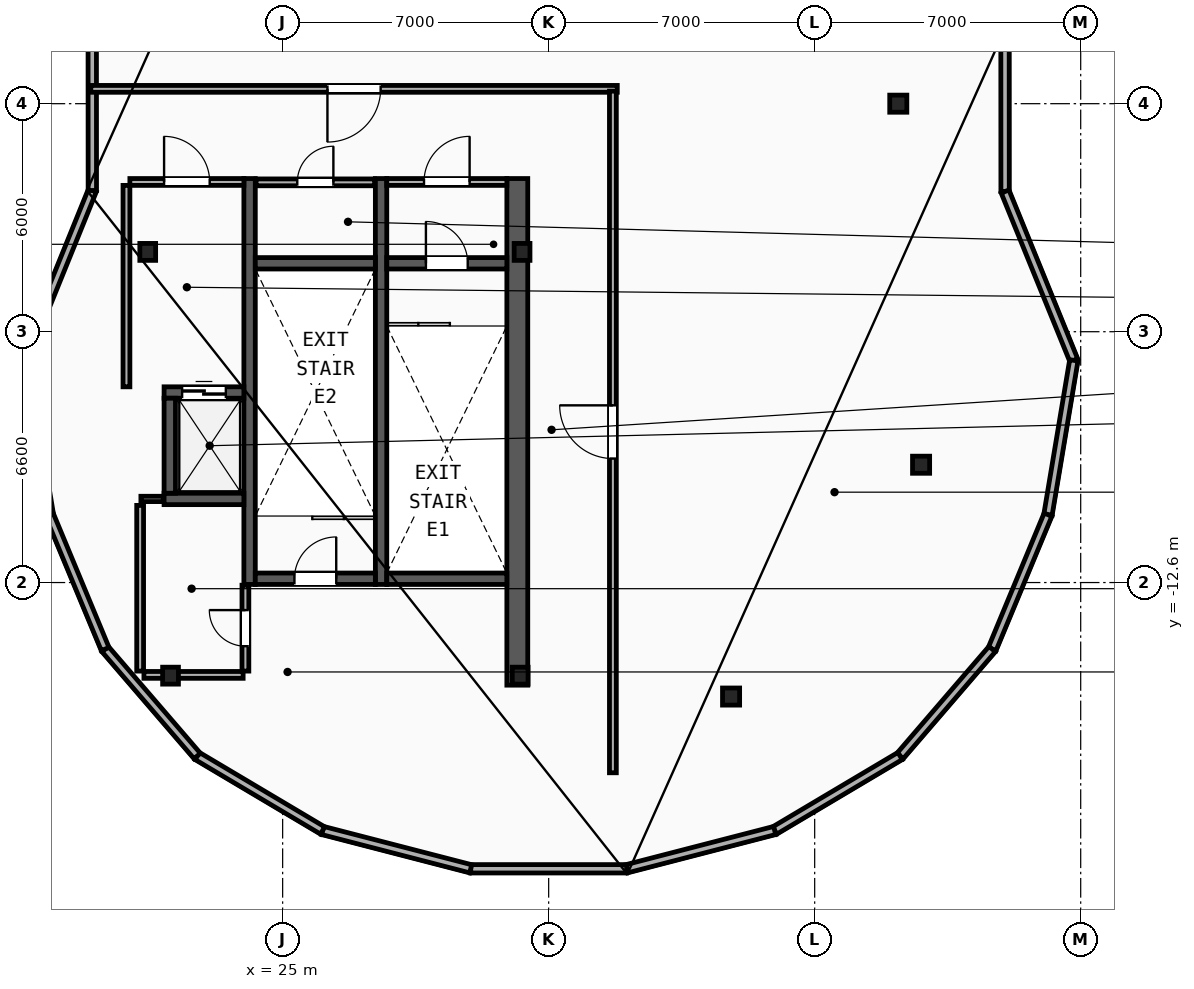
"""IFC4 building model, lengths in metres.
Left out: names, types, materials, properties, quantities, classifications, styles, units other than length and angle.
Written with IfcOpenShell. Run it as: python <this file> out.ifc"""

import sys

from ifc_helpers import new_model, si_unit, direction, frame, frame_2d, origin, origin_2d, place, context, subcontext, project, spatial, rectangle, hollow_rectangle, i_section, extrude, element, fill, save


model = new_model("IFC4")
c1 = context("Model", 3, precision=1e-05, world=origin(), true_north=direction((0.0, 1.0)))
c2 = subcontext(c1, "Body", "Model", "MODEL_VIEW")
j1 = project(units=[si_unit("LENGTHUNIT", "METRE"), si_unit("PLANEANGLEUNIT", "RADIAN")], contexts=[c1])
p1 = place(None, origin())
s1 = spatial("IfcSite", under=j1, at=p1, CompositionType="ELEMENT")
p2 = place(p1, origin())
s2 = spatial("IfcBuilding", under=s1, at=p2, CompositionType="ELEMENT")
p3 = place(p2, frame((0.0, 0.0, 286.4)))
s3 = spatial("IfcBuildingStorey", under=s2, at=p3, CompositionType="ELEMENT", Elevation=286.4)
for number, where, z_axis, x_axis in (
    (1, (31.3, -3.9, 0.0), (0.0, 0.0, 1.0), (1.0, 0.0, 0.0)),
    (2, (21.45, -3.9, 0.0), (0.0, 0.0, 1.0), (1.0, 0.0, 0.0)),
    (3, (22.05, -15.05, 0.0), (0.0, 0.0, 1.0), (1.0, 0.0, 0.0)),
    (4, (31.25, -15.05, 0.0), (0.0, 0.0, 1.0), (1.0, 0.0, 0.0)),
):
    element("IfcColumn", number, at=place(p3, frame(where, z_axis=z_axis, x_axis=x_axis)), inside=s3, PredefinedType="COLUMN", context=c2, shape_type="SweptSolid", body=[
        extrude(i_section(OverallWidth=0.416, OverallDepth=0.446, WebThickness=0.039, FlangeThickness=0.063, FilletRadius=0.018, at=origin_2d()), origin(), (0.0, 0.0, 1.0), 4.93),
    ])
for number, where, z_axis, x_axis in (
    (5, (41.2, 0.0, 0.0), (0.0, 0.0, 1.0), (1.0, 0.0, 0.0)),
    (6, (41.8, -9.5, 0.0), (0.0, 0.0, 1.0), (1.0, 0.0, 0.0)),
    (7, (36.8, -15.6, 0.0), (0.0, 0.0, 1.0), (1.0, 0.0, 0.0)),
):
    element("IfcColumn", number, at=place(p3, frame(where, z_axis=z_axis, x_axis=x_axis)), inside=s3, PredefinedType="COLUMN", context=c2, shape_type="SweptSolid", body=[
        extrude(hollow_rectangle(XDim=0.45, YDim=0.45, WallThickness=0.025, at=origin_2d()), origin(), (0.0, 0.0, 1.0), 4.93),
    ])
p4 = place(p3, frame((44.008, 2.284, 5.2), z_axis=(0.0, 0.0, 1.0), x_axis=(0.000531349553, -0.999999858834, 0.0)))
e8 = element("IfcWall", 8, at=p4, inside=s3, PredefinedType="PARAPET", context=c2, shape_type="SweptSolid", body=[
    extrude(rectangle(XDim=4.595, YDim=0.22, at=frame_2d((2.297, 0.0))), origin(), (0.0, 0.0, 1.0), 2.0),
])
p5 = place(p3, frame((44.01, -2.311, 5.2), z_axis=(0.0, 0.0, 1.0), x_axis=(0.377043082347, -0.926195721246, 0.0)))
e9 = element("IfcWall", 9, at=p5, inside=s3, PredefinedType="PARAPET", context=c2, shape_type="SweptSolid", body=[
    extrude(rectangle(XDim=4.797, YDim=0.22, at=frame_2d((2.399, 0.0))), origin(), (0.0, 0.0, 1.0), 2.0),
])
p6 = place(p3, frame((45.819, -6.754, 5.2), z_axis=(0.0, 0.0, 1.0), x_axis=(-0.165110628258, -0.986275053135, 0.0)))
e10 = element("IfcWall", 10, at=p6, inside=s3, PredefinedType="PARAPET", context=c2, shape_type="SweptSolid", body=[
    extrude(rectangle(XDim=4.116, YDim=0.22, at=frame_2d((2.058, 0.0))), origin(), (0.0, 0.0, 1.0), 2.0),
])
p7 = place(p3, frame((45.14, -10.814, 5.2), z_axis=(0.0, 0.0, 1.0), x_axis=(-0.383669064321, -0.923470654154, 0.0)))
e11 = element("IfcWall", 11, at=p7, inside=s3, PredefinedType="PARAPET", context=c2, shape_type="SweptSolid", body=[
    extrude(rectangle(XDim=3.829, YDim=0.22, at=frame_2d((1.915, 0.0))), origin(), (0.0, 0.0, 1.0), 2.0),
])
p8 = place(p3, frame((43.67, -14.351, 5.2), z_axis=(0.0, 0.0, 1.0), x_axis=(-0.652473840564, -0.757811247858, 0.0)))
e12 = element("IfcWall", 12, at=p8, inside=s3, PredefinedType="PARAPET", context=c2, shape_type="SweptSolid", body=[
    extrude(rectangle(XDim=3.713, YDim=0.22, at=frame_2d((1.856, 0.0))), origin(), (0.0, 0.0, 1.0), 2.0),
])
p9 = place(p3, frame((41.248, -17.164, 5.2), z_axis=(0.0, 0.0, 1.0), x_axis=(-0.859779697284, -0.5106651272, 0.0)))
e13 = element("IfcWall", 13, at=p9, inside=s3, PredefinedType="PARAPET", context=c2, shape_type="SweptSolid", body=[
    extrude(rectangle(XDim=3.839, YDim=0.22, at=frame_2d((1.919, 0.0))), origin(), (0.0, 0.0, 1.0), 2.0),
])
p10 = place(p3, frame((37.948, -19.125, 5.2), z_axis=(0.0, 0.0, 1.0), x_axis=(-0.968151728793, -0.250364194795, 0.0)))
e14 = element("IfcWall", 14, at=p10, inside=s3, PredefinedType="PARAPET", context=c2, shape_type="SweptSolid", body=[
    extrude(rectangle(XDim=4.024, YDim=0.22, at=frame_2d((2.012, 0.0))), origin(), (0.0, 0.0, 1.0), 2.0),
])
p11 = place(p3, frame((34.051, -20.132, 5.2), z_axis=(0.0, 0.0, 1.0), x_axis=(-1.0, 0.0, 0.0)))
e15 = element("IfcWall", 15, at=p11, inside=s3, PredefinedType="PARAPET", context=c2, shape_type="SweptSolid", body=[
    extrude(rectangle(XDim=4.103, YDim=0.22, at=frame_2d((2.051, 0.0))), origin(), (0.0, 0.0, 1.0), 2.0),
])
p12 = place(p3, frame((29.949, -20.132, 5.2), z_axis=(0.0, 0.0, 1.0), x_axis=(-0.968151728793, 0.250364194795, 0.0)))
e16 = element("IfcWall", 16, at=p12, inside=s3, PredefinedType="PARAPET", context=c2, shape_type="SweptSolid", body=[
    extrude(rectangle(XDim=4.024, YDim=0.22, at=frame_2d((2.012, 0.0))), origin(), (0.0, 0.0, 1.0), 2.0),
])
p13 = place(p3, frame((26.052, -19.125, 5.2), z_axis=(0.0, 0.0, 1.0), x_axis=(-0.859779697284, 0.5106651272, 0.0)))
e17 = element("IfcWall", 17, at=p13, inside=s3, PredefinedType="PARAPET", context=c2, shape_type="SweptSolid", body=[
    extrude(rectangle(XDim=3.839, YDim=0.22, at=frame_2d((1.919, 0.0))), origin(), (0.0, 0.0, 1.0), 2.0),
])
p14 = place(p3, frame((22.752, -17.164, 5.2), z_axis=(0.0, 0.0, 1.0), x_axis=(-0.652473840564, 0.757811247858, 0.0)))
e18 = element("IfcWall", 18, at=p14, inside=s3, PredefinedType="PARAPET", context=c2, shape_type="SweptSolid", body=[
    extrude(rectangle(XDim=3.713, YDim=0.22, at=frame_2d((1.856, 0.0))), origin(), (0.0, 0.0, 1.0), 2.0),
])
p15 = place(p3, frame((20.33, -14.351, 5.2), z_axis=(0.0, 0.0, 1.0), x_axis=(-0.383669064321, 0.923470654154, 0.0)))
e19 = element("IfcWall", 19, at=p15, inside=s3, PredefinedType="PARAPET", context=c2, shape_type="SweptSolid", body=[
    extrude(rectangle(XDim=3.829, YDim=0.22, at=frame_2d((1.915, 0.0))), origin(), (0.0, 0.0, 1.0), 2.0),
])
p16 = place(p3, frame((18.86, -10.814, 5.2), z_axis=(0.0, 0.0, 1.0), x_axis=(-0.165110628258, 0.986275053135, 0.0)))
e20 = element("IfcWall", 20, at=p16, inside=s3, PredefinedType="PARAPET", context=c2, shape_type="SweptSolid", body=[
    extrude(rectangle(XDim=4.116, YDim=0.22, at=frame_2d((2.058, 0.0))), origin(), (0.0, 0.0, 1.0), 2.0),
])
p17 = place(p3, frame((18.181, -6.754, 5.2), z_axis=(0.0, 0.0, 1.0), x_axis=(0.375532386136, 0.92680927216, 0.0)))
e21 = element("IfcWall", 21, at=p17, inside=s3, PredefinedType="PARAPET", context=c2, shape_type="SweptSolid", body=[
    extrude(rectangle(XDim=4.823, YDim=0.22, at=frame_2d((2.412, 0.0))), origin(), (0.0, 0.0, 1.0), 2.0),
])
p18 = place(p3, frame((19.992, -2.284, 5.2), z_axis=(0.0, 0.0, 1.0), x_axis=(-0.000531349553, 0.999999858834, 0.0)))
e22 = element("IfcWall", 22, at=p18, inside=s3, PredefinedType="PARAPET", context=c2, shape_type="SweptSolid", body=[
    extrude(rectangle(XDim=4.595, YDim=0.22, at=frame_2d((2.297, 0.0))), origin(), (0.0, 0.0, 1.0), 2.0),
])
p19 = place(p3, frame((31.175, -15.3, 0.0), z_axis=(0.0, 0.0, 1.0), x_axis=(0.0, 1.0, 0.0)))
e23 = element("IfcWall", 23, at=p19, inside=s3, PredefinedType="SHEAR", context=c2, shape_type="SweptSolid", body=[
    extrude(rectangle(XDim=13.33, YDim=0.55, at=frame_2d((6.665, 0.0))), origin(), (0.0, 0.0, 1.0), 4.93),
])
for number, where, z_axis, x_axis in (
    (24, (27.59, -12.65, 0.0), (0.0, 0.0, 1.0), (0.0, 1.0, 0.0)),
    (25, (24.13, -12.65, 0.0), (0.0, 0.0, 1.0), (0.0, 1.0, 0.0)),
):
    element("IfcWall", number, at=place(p3, frame(where, z_axis=z_axis, x_axis=x_axis)), inside=s3, PredefinedType="SHEAR", context=c2, shape_type="SweptSolid", body=[
        extrude(rectangle(XDim=10.68, YDim=0.3, at=frame_2d((5.34, 0.0))), origin(), (0.0, 0.0, 1.0), 4.93),
    ])
p20 = place(p3, frame((27.74, -4.2, 0.0), z_axis=(0.0, 0.0, 1.0), x_axis=(1.0, 0.0, 0.0)))
e26 = element("IfcWall", 26, at=p20, inside=s3, PredefinedType="SHEAR", context=c2, shape_type="SweptSolid", body=[
    extrude(rectangle(XDim=3.16, YDim=0.3, at=frame_2d((1.58, 0.0))), origin(), (0.0, 0.0, 1.0), 4.93),
])
p21 = place(p20, frame((1.03, 0.0, 0.0)))
e27 = element("IfcOpeningElement", 27, at=p21, cuts=e26, PredefinedType="OPENING", context=c2, shape_type="SweptSolid", body=[
    extrude(rectangle(XDim=1.1, YDim=2.15, at=frame_2d((0.55, 1.075))), frame((0.0, 0.16, 0.0), z_axis=(0.0, -1.0, 0.0), x_axis=(1.0, 0.0, 0.0)), (0.0, 0.0, 1.0), 0.32),
])
p22 = place(p3, frame((27.74, -12.5, 0.0), z_axis=(0.0, 0.0, 1.0), x_axis=(1.0, 0.0, 0.0)))
e28 = element("IfcWall", 28, at=p22, inside=s3, PredefinedType="SHEAR", context=c2, shape_type="SweptSolid", body=[
    extrude(rectangle(XDim=3.16, YDim=0.3, at=frame_2d((1.58, 0.0))), origin(), (0.0, 0.0, 1.0), 4.93),
])
p23 = place(p3, frame((24.28, -12.5, 0.0), z_axis=(0.0, 0.0, 1.0), x_axis=(1.0, 0.0, 0.0)))
e29 = element("IfcWall", 29, at=p23, inside=s3, PredefinedType="SHEAR", context=c2, shape_type="SweptSolid", body=[
    extrude(rectangle(XDim=3.16, YDim=0.3, at=frame_2d((1.58, 0.0))), origin(), (0.0, 0.0, 1.0), 4.93),
])
p24 = place(p23, frame((1.03, 0.0, 0.0)))
e30 = element("IfcOpeningElement", 30, at=p24, cuts=e29, PredefinedType="OPENING", context=c2, shape_type="SweptSolid", body=[
    extrude(rectangle(XDim=1.1, YDim=2.15, at=frame_2d((0.55, 1.075))), frame((0.0, 0.16, 0.0), z_axis=(0.0, -1.0, 0.0), x_axis=(1.0, 0.0, 0.0)), (0.0, 0.0, 1.0), 0.32),
])
p25 = place(p3, frame((24.28, -4.2, 0.0), z_axis=(0.0, 0.0, 1.0), x_axis=(1.0, 0.0, 0.0)))
e31 = element("IfcWall", 31, at=p25, inside=s3, PredefinedType="SHEAR", context=c2, shape_type="SweptSolid", body=[
    extrude(rectangle(XDim=3.16, YDim=0.3, at=frame_2d((1.58, 0.0))), origin(), (0.0, 0.0, 1.0), 4.93),
])
p26 = place(p3, frame((20.89, -7.45, 0.0), z_axis=(0.0, 0.0, 1.0), x_axis=(0.0, 1.0, 0.0)))
e32 = element("IfcWall", 32, at=p26, inside=s3, PredefinedType="PARTITIONING", context=c2, shape_type="SweptSolid", body=[
    extrude(rectangle(XDim=5.3, YDim=0.18, at=frame_2d((2.65, 0.0))), origin(), (0.0, 0.0, 1.0), 4.93),
])
p27 = place(p3, frame((20.98, -2.06, 0.0), z_axis=(0.0, 0.0, 1.0), x_axis=(1.0, 0.0, 0.0)))
e33 = element("IfcWall", 33, at=p27, inside=s3, PredefinedType="PARTITIONING", context=c2, shape_type="SweptSolid", body=[
    extrude(rectangle(XDim=3.0, YDim=0.18, at=frame_2d((1.5, 0.0))), origin(), (0.0, 0.0, 1.0), 4.93),
])
p28 = place(p27, frame((0.9, 0.0, 0.0)))
e34 = element("IfcOpeningElement", 34, at=p28, cuts=e33, PredefinedType="OPENING", context=c2, shape_type="SweptSolid", body=[
    extrude(rectangle(XDim=1.2, YDim=2.15, at=frame_2d((0.6, 1.075))), frame((0.0, 0.1, 0.0), z_axis=(0.0, -1.0, 0.0), x_axis=(1.0, 0.0, 0.0)), (0.0, 0.0, 1.0), 0.2),
])
p29 = place(p3, frame((27.74, -2.06, 0.0), z_axis=(0.0, 0.0, 1.0), x_axis=(1.0, 0.0, 0.0)))
e35 = element("IfcWall", 35, at=p29, inside=s3, PredefinedType="PARTITIONING", context=c2, shape_type="SweptSolid", body=[
    extrude(rectangle(XDim=3.16, YDim=0.18, at=frame_2d((1.58, 0.0))), origin(), (0.0, 0.0, 1.0), 4.93),
])
p30 = place(p29, frame((0.98, 0.0, 0.0)))
e36 = element("IfcOpeningElement", 36, at=p30, cuts=e35, PredefinedType="OPENING", context=c2, shape_type="SweptSolid", body=[
    extrude(rectangle(XDim=1.2, YDim=2.15, at=frame_2d((0.6, 1.075))), frame((0.0, 0.1, 0.0), z_axis=(0.0, -1.0, 0.0), x_axis=(1.0, 0.0, 0.0)), (0.0, 0.0, 1.0), 0.2),
])
p31 = place(p3, frame((21.88, -7.6, 0.0), z_axis=(0.0, 0.0, 1.0), x_axis=(1.0, 0.0, 0.0)))
e37 = element("IfcWall", 37, at=p31, inside=s3, PredefinedType="SHEAR", context=c2, shape_type="SweptSolid", body=[
    extrude(rectangle(XDim=2.1, YDim=0.3, at=frame_2d((1.05, 0.0))), origin(), (0.0, 0.0, 1.0), 4.93),
])
p32 = place(p31, frame((0.475, 0.0, 0.0)))
e38 = element("IfcOpeningElement", 38, at=p32, cuts=e37, PredefinedType="OPENING", context=c2, shape_type="SweptSolid", body=[
    extrude(rectangle(XDim=1.15, YDim=2.2, at=frame_2d((0.575, 1.1))), frame((0.0, 0.16, 0.0), z_axis=(0.0, -1.0, 0.0), x_axis=(1.0, 0.0, 0.0)), (0.0, 0.0, 1.0), 0.32),
])
p33 = place(p3, frame((21.88, -10.4, 0.0), z_axis=(0.0, 0.0, 1.0), x_axis=(1.0, 0.0, 0.0)))
e39 = element("IfcWall", 39, at=p33, inside=s3, PredefinedType="SHEAR", context=c2, shape_type="SweptSolid", body=[
    extrude(rectangle(XDim=2.1, YDim=0.3, at=frame_2d((1.05, 0.0))), origin(), (0.0, 0.0, 1.0), 4.93),
])
p34 = place(p3, frame((22.03, -10.25, 0.0), z_axis=(0.0, 0.0, 1.0), x_axis=(0.0, 1.0, 0.0)))
e40 = element("IfcWall", 40, at=p34, inside=s3, PredefinedType="SHEAR", context=c2, shape_type="SweptSolid", body=[
    extrude(rectangle(XDim=2.5, YDim=0.3, at=frame_2d((1.25, 0.0))), origin(), (0.0, 0.0, 1.0), 4.93),
])
p35 = place(p3, frame((21.27, -10.4, 0.0), z_axis=(0.0, 0.0, 1.0), x_axis=(1.0, 0.0, 0.0)))
e41 = element("IfcWall", 41, at=p35, inside=s3, PredefinedType="PARTITIONING", context=c2, shape_type="SweptSolid", body=[
    extrude(rectangle(XDim=0.59, YDim=0.14, at=frame_2d((0.295, 0.0))), origin(), (0.0, 0.0, 1.0), 4.93),
])
p36 = place(p3, frame((21.25, -14.93, 0.0), z_axis=(0.0, 0.0, 1.0), x_axis=(0.0, 1.0, 0.0)))
e42 = element("IfcWall", 42, at=p36, inside=s3, PredefinedType="PARTITIONING", context=c2, shape_type="SweptSolid", body=[
    extrude(rectangle(XDim=4.36, YDim=0.18, at=frame_2d((2.18, 0.0))), origin(), (0.0, 0.0, 1.0), 4.93),
])
p37 = place(p3, frame((21.35, -15.03, 0.0), z_axis=(0.0, 0.0, 1.0), x_axis=(1.0, 0.0, 0.0)))
e43 = element("IfcWall", 43, at=p37, inside=s3, PredefinedType="PARTITIONING", context=c2, shape_type="SweptSolid", body=[
    extrude(rectangle(XDim=2.61, YDim=0.18, at=frame_2d((1.305, 0.0))), origin(), (0.0, 0.0, 1.0), 4.003),
])
p38 = place(p3, frame((24.3, -2.07, 0.0), z_axis=(0.0, 0.0, 1.0), x_axis=(1.0, 0.0, 0.0)))
e44 = element("IfcWall", 44, at=p38, inside=s3, PredefinedType="PARTITIONING", context=c2, shape_type="SweptSolid", body=[
    extrude(rectangle(XDim=3.12, YDim=0.18, at=frame_2d((1.56, 0.0))), origin(), (0.0, 0.0, 1.0), 4.93),
])
p39 = place(p38, frame((1.085, 0.0, 0.0)))
e45 = element("IfcOpeningElement", 45, at=p39, cuts=e44, PredefinedType="OPENING", context=c2, shape_type="SweptSolid", body=[
    extrude(rectangle(XDim=0.95, YDim=2.1, at=frame_2d((0.475, 1.05))), frame((0.0, 0.1, 0.0), z_axis=(0.0, -1.0, 0.0), x_axis=(1.0, 0.0, 0.0)), (0.0, 0.0, 1.0), 0.2),
])
p40 = place(p3, frame((24.02, -14.93, 0.0), z_axis=(0.0, 0.0, 1.0), x_axis=(0.0, 1.0, 0.0)))
e46 = element("IfcWall", 46, at=p40, inside=s3, PredefinedType="PARTITIONING", context=c2, shape_type="SweptSolid", body=[
    extrude(rectangle(XDim=2.26, YDim=0.18, at=frame_2d((1.13, 0.0))), origin(), (0.0, 0.0, 1.0), 4.93),
])
p41 = place(p40, frame((0.655, 0.0, 0.0)))
e47 = element("IfcOpeningElement", 47, at=p41, cuts=e46, PredefinedType="OPENING", context=c2, shape_type="SweptSolid", body=[
    extrude(rectangle(XDim=0.95, YDim=2.1, at=frame_2d((0.475, 1.05))), frame((0.0, 0.1, 0.0), z_axis=(0.0, -1.0, 0.0), x_axis=(1.0, 0.0, 0.0)), (0.0, 0.0, 1.0), 0.2),
])
p42 = place(p3, frame((33.805, 0.39, 0.0), z_axis=(0.0, 0.0, 1.0), x_axis=(-1.0, 0.0, 0.0)))
e48 = element("IfcWall", 48, at=p42, inside=s3, PredefinedType="PARTITIONING", context=c2, shape_type="SweptSolid", body=[
    extrude(rectangle(XDim=13.854, YDim=0.18, at=frame_2d((6.927, 0.0))), origin(), (0.0, 0.0, 1.0), 4.93),
])
p43 = place(p42, frame((6.227, 0.0, 0.0)))
e49 = element("IfcOpeningElement", 49, at=p43, cuts=e48, PredefinedType="OPENING", context=c2, shape_type="SweptSolid", body=[
    extrude(rectangle(XDim=1.4, YDim=2.2, at=frame_2d((0.7, 1.1))), frame((0.0, 0.1, 0.0), z_axis=(0.0, -1.0, 0.0), x_axis=(1.0, 0.0, 0.0)), (0.0, 0.0, 1.0), 0.2),
])
p44 = place(p3, frame((33.69, -17.605, 0.0), z_axis=(0.0, 0.0, 1.0), x_axis=(0.0, 1.0, 0.0)))
e50 = element("IfcWall", 50, at=p44, inside=s3, PredefinedType="PARTITIONING", context=c2, shape_type="SweptSolid", body=[
    extrude(rectangle(XDim=17.935, YDim=0.18, at=frame_2d((8.968, 0.0))), origin(), (0.0, 0.0, 1.0), 4.93),
])
p45 = place(p44, frame((8.268, 0.0, 0.0)))
e51 = element("IfcOpeningElement", 51, at=p45, cuts=e50, PredefinedType="OPENING", context=c2, shape_type="SweptSolid", body=[
    extrude(rectangle(XDim=1.4, YDim=2.2, at=frame_2d((0.7, 1.1))), frame((0.0, 0.1, 0.0), z_axis=(0.0, -1.0, 0.0), x_axis=(1.0, 0.0, 0.0)), (0.0, 0.0, 1.0), 0.2),
])
p46 = place(p21, origin())
e52 = element("IfcDoor", 52, at=p46, inside=s3, OperationType="SINGLE_SWING_LEFT", PredefinedType="DOOR", context=c2, shape_type="SweptSolid", body=[
    extrude(rectangle(XDim=1.1, YDim=2.15, at=frame_2d((0.55, 1.075))), frame((0.0, 0.025, 0.0), z_axis=(0.0, -1.0, 0.0), x_axis=(1.0, 0.0, 0.0)), (0.0, 0.0, 1.0), 0.05),
])
fill(e27, e52)
p47 = place(p24, origin())
e53 = element("IfcDoor", 53, at=p47, inside=s3, OperationType="SINGLE_SWING_RIGHT", PredefinedType="DOOR", context=c2, shape_type="SweptSolid", body=[
    extrude(rectangle(XDim=1.1, YDim=2.15, at=frame_2d((0.55, 1.075))), frame((0.0, 0.025, 0.0), z_axis=(0.0, -1.0, 0.0), x_axis=(1.0, 0.0, 0.0)), (0.0, 0.0, 1.0), 0.05),
])
fill(e30, e53)
p48 = place(p28, origin())
e54 = element("IfcDoor", 54, at=p48, inside=s3, OperationType="SINGLE_SWING_LEFT", PredefinedType="DOOR", context=c2, shape_type="SweptSolid", body=[
    extrude(rectangle(XDim=1.2, YDim=2.15, at=frame_2d((0.6, 1.075))), frame((0.0, 0.025, 0.0), z_axis=(0.0, -1.0, 0.0), x_axis=(1.0, 0.0, 0.0)), (0.0, 0.0, 1.0), 0.05),
])
fill(e34, e54)
p49 = place(p30, origin())
e55 = element("IfcDoor", 55, at=p49, inside=s3, OperationType="SINGLE_SWING_RIGHT", PredefinedType="DOOR", context=c2, shape_type="SweptSolid", body=[
    extrude(rectangle(XDim=1.2, YDim=2.15, at=frame_2d((0.6, 1.075))), frame((0.0, 0.025, 0.0), z_axis=(0.0, -1.0, 0.0), x_axis=(1.0, 0.0, 0.0)), (0.0, 0.0, 1.0), 0.05),
])
fill(e36, e55)
p50 = place(p32, origin())
e56 = element("IfcDoor", 56, at=p50, inside=s3, OperationType="SLIDING_TO_LEFT", PredefinedType="TRAPDOOR", context=c2, shape_type="SweptSolid", body=[
    extrude(rectangle(XDim=1.15, YDim=2.2, at=frame_2d((0.575, 1.1))), frame((0.0, 0.025, 0.0), z_axis=(0.0, -1.0, 0.0), x_axis=(1.0, 0.0, 0.0)), (0.0, 0.0, 1.0), 0.05),
])
fill(e38, e56)
p51 = place(p45, origin())
e57 = element("IfcDoor", 57, at=p51, inside=s3, OperationType="SINGLE_SWING_RIGHT", PredefinedType="DOOR", context=c2, shape_type="SweptSolid", body=[
    extrude(rectangle(XDim=1.4, YDim=2.2, at=frame_2d((0.7, 1.1))), frame((0.0, 0.025, 0.0), z_axis=(0.0, -1.0, 0.0), x_axis=(1.0, 0.0, 0.0)), (0.0, 0.0, 1.0), 0.05),
])
fill(e51, e57)
p52 = place(p43, origin())
e58 = element("IfcDoor", 58, at=p52, inside=s3, OperationType="SINGLE_SWING_RIGHT", PredefinedType="DOOR", context=c2, shape_type="SweptSolid", body=[
    extrude(rectangle(XDim=1.4, YDim=2.2, at=frame_2d((0.7, 1.1))), frame((0.0, 0.025, 0.0), z_axis=(0.0, -1.0, 0.0), x_axis=(1.0, 0.0, 0.0)), (0.0, 0.0, 1.0), 0.05),
])
fill(e49, e58)
p53 = place(p39, origin())
e59 = element("IfcDoor", 59, at=p53, inside=s3, OperationType="SINGLE_SWING_RIGHT", PredefinedType="DOOR", context=c2, shape_type="SweptSolid", body=[
    extrude(rectangle(XDim=0.95, YDim=2.1, at=frame_2d((0.475, 1.05))), frame((0.0, 0.025, 0.0), z_axis=(0.0, -1.0, 0.0), x_axis=(1.0, 0.0, 0.0)), (0.0, 0.0, 1.0), 0.05),
])
fill(e45, e59)
p54 = place(p41, origin())
e60 = element("IfcDoor", 60, at=p54, inside=s3, OperationType="SINGLE_SWING_RIGHT", PredefinedType="DOOR", context=c2, shape_type="SweptSolid", body=[
    extrude(rectangle(XDim=0.95, YDim=2.1, at=frame_2d((0.475, 1.05))), frame((0.0, 0.025, 0.0), z_axis=(0.0, -1.0, 0.0), x_axis=(1.0, 0.0, 0.0)), (0.0, 0.0, 1.0), 0.05),
])
fill(e47, e60)
save(model, sys.argv[1])
